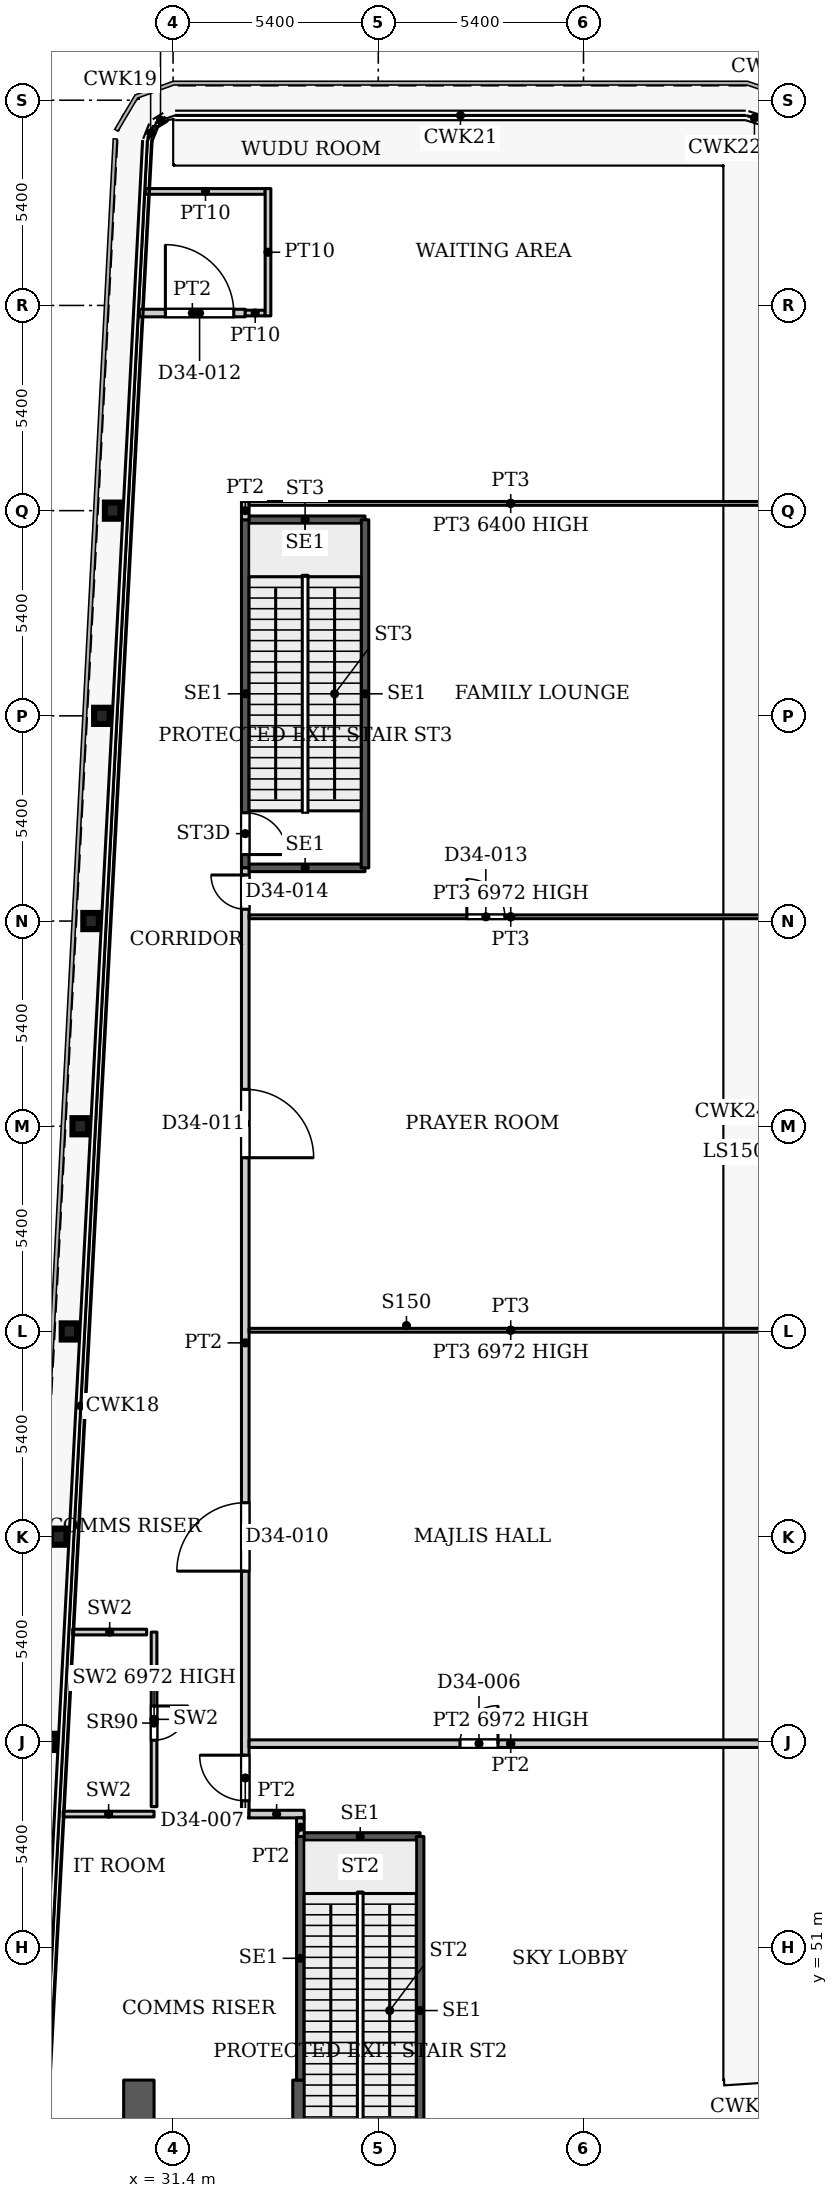
"""IFC4 building model, lengths in metres.
Left out: names, types, materials, properties, quantities, classifications, styles, units other than length and angle.
Written with IfcOpenShell. Run it as: python <this file> out.ifc"""

import sys

from ifc_helpers import new_model, si_unit, direction, frame, frame_2d, origin, origin_2d, place, context, subcontext, project, spatial, rectangle, i_section, extrude, source, transform, mapped, element, fill, save


model = new_model("IFC4")
c1 = context("Model", 3, precision=1e-05, world=origin(), true_north=direction((0.0, 1.0)))
c2 = subcontext(c1, "Body", "Model", "MODEL_VIEW")
j1 = project(units=[si_unit("LENGTHUNIT", "METRE"), si_unit("PLANEANGLEUNIT", "RADIAN")], contexts=[c1])
p1 = place(None, origin())
s1 = spatial("IfcSite", under=j1, at=p1, CompositionType="ELEMENT")
p2 = place(p1, origin())
s2 = spatial("IfcBuilding", under=s1, at=p2, CompositionType="ELEMENT")
p3 = place(p2, frame((0.0, 0.0, 144.8)))
s3 = spatial("IfcBuildingStorey", under=s2, at=p3, CompositionType="ELEMENT", Elevation=144.8)
for number, where, z_axis, x_axis in (
    (1, (28.106, 56.4, 0.0), (0.0, 0.0, 1.0), (1.0, 0.0, 0.0)),
    (2, (28.39, 61.8, 0.0), (0.0, 0.0, 1.0), (1.0, 0.0, 0.0)),
    (3, (28.674, 67.2, 0.0), (0.0, 0.0, 1.0), (1.0, 0.0, 0.0)),
    (4, (28.958, 72.6, 0.0), (0.0, 0.0, 1.0), (1.0, 0.0, 0.0)),
    (5, (29.243, 78.0, 0.0), (0.0, 0.0, 1.0), (1.0, 0.0, 0.0)),
    (6, (29.527, 83.4, 0.0), (0.0, 0.0, 1.0), (1.0, 0.0, 0.0)),
    (7, (29.811, 88.8, 0.0), (0.0, 0.0, 1.0), (1.0, 0.0, 0.0)),
):
    element("IfcColumn", number, at=place(p3, frame(where, z_axis=z_axis, x_axis=x_axis)), inside=s3, PredefinedType="COLUMN", context=c2, shape_type="SweptSolid", body=[
        extrude(i_section(OverallWidth=0.409, OverallDepth=0.425, WebThickness=0.033, FlangeThickness=0.052, FilletRadius=0.013, at=origin_2d()), origin(), (0.0, 0.0, 1.0), 7.8),
    ])
p4 = place(p3, frame((34.75, 29.05, 0.0), z_axis=(0.0, 0.0, 1.0), x_axis=(0.0, 1.0, 0.0)))
e8 = element("IfcWall", 8, at=p4, inside=s3, PredefinedType="SHEAR", context=c2, shape_type="SweptSolid", body=[
    extrude(rectangle(XDim=18.45, YDim=0.4, at=frame_2d((9.225, 0.0))), origin(), (0.0, 0.0, 1.0), 7.8),
])
p5 = place(p4, frame((8.025, 0.0, 0.0)))
e9 = element("IfcOpeningElement", 9, at=p5, cuts=e8, PredefinedType="OPENING", context=c2, shape_type="SweptSolid", body=[
    extrude(rectangle(XDim=1.1, YDim=2.2, at=frame_2d((0.55, 1.1))), frame((0.0, 0.21, 0.0), z_axis=(0.0, -1.0, 0.0), x_axis=(1.0, 0.0, 0.0)), (0.0, 0.0, 1.0), 0.42),
])
p6 = place(p4, frame((10.875, 0.0, 0.0)))
e10 = element("IfcOpeningElement", 10, at=p6, cuts=e8, PredefinedType="OPENING", context=c2, shape_type="SweptSolid", body=[
    extrude(rectangle(XDim=1.1, YDim=2.2, at=frame_2d((0.55, 1.1))), frame((0.0, 0.21, 0.0), z_axis=(0.0, -1.0, 0.0), x_axis=(1.0, 0.0, 0.0)), (0.0, 0.0, 1.0), 0.42),
])
p7 = place(p4, frame((13.725, 0.0, 0.0)))
e11 = element("IfcOpeningElement", 11, at=p7, cuts=e8, PredefinedType="OPENING", context=c2, shape_type="SweptSolid", body=[
    extrude(rectangle(XDim=1.1, YDim=2.2, at=frame_2d((0.55, 1.1))), frame((0.0, 0.21, 0.0), z_axis=(0.0, -1.0, 0.0), x_axis=(1.0, 0.0, 0.0)), (0.0, 0.0, 1.0), 0.42),
])
p8 = place(p4, frame((15.95, 0.0, 0.0)))
e12 = element("IfcOpeningElement", 12, at=p8, cuts=e8, PredefinedType="OPENING", context=c2, shape_type="SweptSolid", body=[
    extrude(rectangle(XDim=1.1, YDim=2.2, at=frame_2d((0.55, 1.1))), frame((0.0, 0.21, 0.0), z_axis=(0.0, -1.0, 0.0), x_axis=(1.0, 0.0, 0.0)), (0.0, 0.0, 1.0), 0.42),
])
p9 = place(p3, frame((30.5, 29.05, 0.0), z_axis=(0.0, 0.0, 1.0), x_axis=(0.0, 1.0, 0.0)))
e13 = element("IfcWall", 13, at=p9, inside=s3, PredefinedType="SHEAR", context=c2, shape_type="SweptSolid", body=[
    extrude(rectangle(XDim=18.45, YDim=0.8, at=frame_2d((9.225, 0.0))), origin(), (0.0, 0.0, 1.0), 7.8),
])
p10 = place(p9, frame((1.5, 0.0, 0.0)))
e14 = element("IfcOpeningElement", 14, at=p10, cuts=e13, PredefinedType="OPENING", context=c2, shape_type="SweptSolid", body=[
    extrude(rectangle(XDim=0.9, YDim=2.2, at=frame_2d((0.45, 1.1))), frame((0.0, 0.41, 0.0), z_axis=(0.0, -1.0, 0.0), x_axis=(1.0, 0.0, 0.0)), (0.0, 0.0, 1.0), 0.82),
])
p11 = place(p9, frame((7.744, 0.0, 0.0)))
e15 = element("IfcOpeningElement", 15, at=p11, cuts=e13, PredefinedType="OPENING", context=c2, shape_type="SweptSolid", body=[
    extrude(rectangle(XDim=0.9, YDim=2.2, at=frame_2d((0.45, 1.1))), frame((0.0, 0.41, 0.0), z_axis=(0.0, -1.0, 0.0), x_axis=(1.0, 0.0, 0.0)), (0.0, 0.0, 1.0), 0.82),
])
p12 = place(p9, frame((11.568, 0.0, 0.0)))
e16 = element("IfcOpeningElement", 16, at=p12, cuts=e13, PredefinedType="OPENING", context=c2, shape_type="SweptSolid", body=[
    extrude(rectangle(XDim=0.9, YDim=2.2, at=frame_2d((0.45, 1.1))), frame((0.0, 0.41, 0.0), z_axis=(0.0, -1.0, 0.0), x_axis=(1.0, 0.0, 0.0)), (0.0, 0.0, 1.0), 0.82),
])
p13 = place(p3, frame((34.75, 53.91, 0.0), z_axis=(0.0, 0.0, 1.0), x_axis=(1.0, 0.0, 0.0)))
e17 = element("IfcWall", 17, at=p13, inside=s3, PredefinedType="SHEAR", context=c2, shape_type="SweptSolid", body=[
    extrude(rectangle(XDim=3.15, YDim=0.2, at=frame_2d((1.575, 0.0))), origin(), (0.0, 0.0, 1.0), 7.8),
])
p14 = place(p3, frame((34.75, 47.5, 0.0), z_axis=(0.0, 0.0, 1.0), x_axis=(0.0, 1.0, 0.0)))
e18 = element("IfcWall", 18, at=p14, inside=s3, PredefinedType="SHEAR", context=c2, shape_type="SweptSolid", body=[
    extrude(rectangle(XDim=6.41, YDim=0.2, at=frame_2d((3.205, 0.0))), origin(), (0.0, 0.0, 1.0), 7.8),
])
p15 = place(p3, frame((37.9, 44.75, 0.0), z_axis=(0.0, 0.0, 1.0), x_axis=(0.0, 1.0, 0.0)))
e19 = element("IfcWall", 19, at=p15, inside=s3, PredefinedType="SHEAR", context=c2, shape_type="SweptSolid", body=[
    extrude(rectangle(XDim=9.16, YDim=0.2, at=frame_2d((4.58, 0.0))), origin(), (0.0, 0.0, 1.0), 7.8),
])
for number, where, z_axis, x_axis in (
    (20, (33.3, 79.4, 0.0), (0.0, 0.0, 1.0), (1.0, 0.0, 0.0)),
    (21, (33.3, 88.56, 0.0), (0.0, 0.0, 1.0), (1.0, 0.0, 0.0)),
):
    element("IfcWall", number, at=place(p3, frame(where, z_axis=z_axis, x_axis=x_axis)), inside=s3, PredefinedType="SHEAR", context=c2, shape_type="SweptSolid", body=[
        extrude(rectangle(XDim=3.15, YDim=0.2, at=frame_2d((1.575, 0.0))), origin(), (0.0, 0.0, 1.0), 7.8),
    ])
p16 = place(p3, frame((33.3, 79.4, 0.0), z_axis=(0.0, 0.0, 1.0), x_axis=(0.0, 1.0, 0.0)))
e22 = element("IfcWall", 22, at=p16, inside=s3, PredefinedType="SHEAR", context=c2, shape_type="SweptSolid", body=[
    extrude(rectangle(XDim=9.16, YDim=0.2, at=frame_2d((4.58, 0.0))), origin(), (0.0, 0.0, 1.0), 7.8),
])
p17 = place(p16, frame((0.35, 0.0, 0.0)))
e23 = element("IfcOpeningElement", 23, at=p17, cuts=e22, PredefinedType="OPENING", context=c2, shape_type="SweptSolid", body=[
    extrude(rectangle(XDim=1.1, YDim=2.2, at=frame_2d((0.55, 1.1))), frame((0.0, 0.11, 0.0), z_axis=(0.0, -1.0, 0.0), x_axis=(1.0, 0.0, 0.0)), (0.0, 0.0, 1.0), 0.22),
])
p18 = place(p3, frame((36.45, 79.4, 0.0), z_axis=(0.0, 0.0, 1.0), x_axis=(0.0, 1.0, 0.0)))
e24 = element("IfcWall", 24, at=p18, inside=s3, PredefinedType="SHEAR", context=c2, shape_type="SweptSolid", body=[
    extrude(rectangle(XDim=9.16, YDim=0.2, at=frame_2d((4.58, 0.0))), origin(), (0.0, 0.0, 1.0), 7.8),
])
p19 = place(p3, frame((28.508, 54.5, 0.0), z_axis=(0.0, 0.0, 1.0), x_axis=(1.0, 0.0, 0.0)))
e25 = element("IfcWall", 25, at=p19, inside=s3, PredefinedType="PARTITIONING", context=c2, shape_type="SweptSolid", body=[
    extrude(rectangle(XDim=2.392, YDim=0.15, at=frame_2d((1.196, 0.0))), origin(), (0.0, 0.0, 1.0), 7.8),
])
p20 = place(p3, frame((30.9, 54.695, 0.0), z_axis=(0.0, 0.0, 1.0), x_axis=(0.0, 1.0, 0.0)))
e26 = element("IfcWall", 26, at=p20, inside=s3, PredefinedType="PARTITIONING", context=c2, shape_type="SweptSolid", body=[
    extrude(rectangle(XDim=4.595, YDim=0.15, at=frame_2d((2.297, 0.0))), origin(), (0.0, 0.0, 1.0), 6.972),
])
p21 = place(p20, frame((1.75, 0.0, 0.0)))
e27 = element("IfcOpeningElement", 27, at=p21, cuts=e26, PredefinedType="OPENING", context=c2, shape_type="SweptSolid", body=[
    extrude(rectangle(XDim=0.9, YDim=2.2, at=frame_2d((0.45, 1.1))), frame((0.0, 0.085, 0.0), z_axis=(0.0, -1.0, 0.0), x_axis=(1.0, 0.0, 0.0)), (0.0, 0.0, 1.0), 0.17),
])
p22 = place(p3, frame((28.76, 59.29, 0.0), z_axis=(0.0, 0.0, 1.0), x_axis=(1.0, 0.0, 0.0)))
e28 = element("IfcWall", 28, at=p22, inside=s3, PredefinedType="PARTITIONING", context=c2, shape_type="SweptSolid", body=[
    extrude(rectangle(XDim=1.945, YDim=0.15, at=frame_2d((0.973, 0.0))), origin(), (0.0, 0.0, 1.0), 7.8),
])
p23 = place(p3, frame((30.683, 97.2, 0.0), z_axis=(0.0, 0.0, 1.0), x_axis=(1.0, 0.0, 0.0)))
e29 = element("IfcWall", 29, at=p23, inside=s3, PredefinedType="PARTITIONING", context=c2, shape_type="SweptSolid", body=[
    extrude(rectangle(XDim=3.14, YDim=0.15, at=frame_2d((1.57, 0.0))), origin(), (0.0, 0.0, 1.0), 7.5),
])
p24 = place(p3, frame((30.515, 94.0, 0.0), z_axis=(0.0, 0.0, 1.0), x_axis=(1.0, 0.0, 0.0)))
e30 = element("IfcWall", 30, at=p24, inside=s3, PredefinedType="PARTITIONING", context=c2, shape_type="SweptSolid", body=[
    extrude(rectangle(XDim=2.785, YDim=0.2, at=frame_2d((1.393, 0.0))), origin(), (0.0, 0.0, 1.0), 7.5),
])
p25 = place(p24, frame((0.683, 0.0, 0.0)))
e31 = element("IfcOpeningElement", 31, at=p25, cuts=e30, PredefinedType="OPENING", context=c2, shape_type="SweptSolid", body=[
    extrude(rectangle(XDim=1.8, YDim=2.1, at=frame_2d((0.9, 1.05))), frame((0.0, 0.11, 0.0), z_axis=(0.0, -1.0, 0.0), x_axis=(1.0, 0.0, 0.0)), (0.0, 0.0, 1.0), 0.22),
])
p26 = place(p3, frame((33.3, 54.4, 0.0), z_axis=(0.0, 0.0, 1.0), x_axis=(0.0, 1.0, 0.0)))
e32 = element("IfcWall", 32, at=p26, inside=s3, PredefinedType="PARTITIONING", context=c2, shape_type="SweptSolid", body=[
    extrude(rectangle(XDim=25.0, YDim=0.2, at=frame_2d((12.5, 0.0))), origin(), (0.0, 0.0, 1.0), 7.5),
])
p27 = place(p26, frame((0.45, 0.0, 0.0)))
e33 = element("IfcOpeningElement", 33, at=p27, cuts=e32, PredefinedType="OPENING", context=c2, shape_type="SweptSolid", body=[
    extrude(rectangle(XDim=1.2, YDim=2.1, at=frame_2d((0.6, 1.05))), frame((0.0, 0.11, 0.0), z_axis=(0.0, -1.0, 0.0), x_axis=(1.0, 0.0, 0.0)), (0.0, 0.0, 1.0), 0.22),
])
p28 = place(p26, frame((6.493, 0.0, 0.0)))
e34 = element("IfcOpeningElement", 34, at=p28, cuts=e32, PredefinedType="OPENING", context=c2, shape_type="SweptSolid", body=[
    extrude(rectangle(XDim=1.8, YDim=2.1, at=frame_2d((0.9, 1.05))), frame((0.0, 0.11, 0.0), z_axis=(0.0, -1.0, 0.0), x_axis=(1.0, 0.0, 0.0)), (0.0, 0.0, 1.0), 0.22),
])
p29 = place(p26, frame((17.372, 0.0, 0.0)))
e35 = element("IfcOpeningElement", 35, at=p29, cuts=e32, PredefinedType="OPENING", context=c2, shape_type="SweptSolid", body=[
    extrude(rectangle(XDim=1.8, YDim=2.1, at=frame_2d((0.9, 1.05))), frame((0.0, 0.11, 0.0), z_axis=(0.0, -1.0, 0.0), x_axis=(1.0, 0.0, 0.0)), (0.0, 0.0, 1.0), 0.22),
])
p30 = place(p26, frame((23.912, 0.0, 0.0)))
e36 = element("IfcOpeningElement", 36, at=p30, cuts=e32, PredefinedType="OPENING", context=c2, shape_type="SweptSolid", body=[
    extrude(rectangle(XDim=0.9, YDim=2.1, at=frame_2d((0.45, 1.05))), frame((0.0, 0.11, 0.0), z_axis=(0.0, -1.0, 0.0), x_axis=(1.0, 0.0, 0.0)), (0.0, 0.0, 1.0), 0.22),
])
p31 = place(p3, frame((33.3, 88.56, 0.0), z_axis=(0.0, 0.0, 1.0), x_axis=(0.0, 1.0, 0.0)))
e37 = element("IfcWall", 37, at=p31, inside=s3, PredefinedType="PARTITIONING", context=c2, shape_type="SweptSolid", body=[
    extrude(rectangle(XDim=0.481, YDim=0.2, at=frame_2d((0.24, 0.0))), origin(), (0.0, 0.0, 1.0), 7.5),
])
p32 = place(p3, frame((33.3, 94.0, 0.0), z_axis=(0.0, 0.0, 1.0), x_axis=(1.0, 0.0, 0.0)))
e38 = element("IfcWall", 38, at=p32, inside=s3, PredefinedType="PARTITIONING", context=c2, shape_type="SweptSolid", body=[
    extrude(rectangle(XDim=0.523, YDim=0.15, at=frame_2d((0.261, 0.0))), origin(), (0.0, 0.0, 1.0), 7.5),
])
p33 = place(p3, frame((33.4, 54.5, 0.0), z_axis=(0.0, 0.0, 1.0), x_axis=(1.0, 0.0, 0.0)))
e39 = element("IfcWall", 39, at=p33, inside=s3, PredefinedType="PARTITIONING", context=c2, shape_type="SweptSolid", body=[
    extrude(rectangle(XDim=1.45, YDim=0.2, at=frame_2d((0.725, 0.0))), origin(), (0.0, 0.0, 1.0), 7.5),
])
p34 = place(p3, frame((33.4, 56.353, 0.0), z_axis=(0.0, 0.0, 1.0), x_axis=(1.0, 0.0, 0.0)))
e40 = element("IfcWall", 40, at=p34, inside=s3, PredefinedType="PARTITIONING", context=c2, shape_type="SweptSolid", body=[
    extrude(rectangle(XDim=13.77, YDim=0.2, at=frame_2d((6.885, 0.0))), origin(), (0.0, 0.0, 1.0), 6.972),
])
p35 = place(p34, frame((5.55, 0.0, 0.0)))
e41 = element("IfcOpeningElement", 41, at=p35, cuts=e40, PredefinedType="OPENING", context=c2, shape_type="SweptSolid", body=[
    extrude(rectangle(XDim=1.0, YDim=2.1, at=frame_2d((0.5, 1.05))), frame((0.0, 0.11, 0.0), z_axis=(0.0, -1.0, 0.0), x_axis=(1.0, 0.0, 0.0)), (0.0, 0.0, 1.0), 0.22),
])
p36 = place(p3, frame((33.4, 67.232, 0.0), z_axis=(0.0, 0.0, 1.0), x_axis=(1.0, 0.0, 0.0)))
e42 = element("IfcWall", 42, at=p36, inside=s3, PredefinedType="PARTITIONING", context=c2, shape_type="SweptSolid", body=[
    extrude(rectangle(XDim=13.77, YDim=0.1, at=frame_2d((6.885, 0.0))), origin(), (0.0, 0.0, 1.0), 6.972),
])
p37 = place(p3, frame((33.4, 78.112, 0.0), z_axis=(0.0, 0.0, 1.0), x_axis=(1.0, 0.0, 0.0)))
e43 = element("IfcWall", 43, at=p37, inside=s3, PredefinedType="PARTITIONING", context=c2, shape_type="SweptSolid", body=[
    extrude(rectangle(XDim=13.77, YDim=0.1, at=frame_2d((6.885, 0.0))), origin(), (0.0, 0.0, 1.0), 6.972),
])
p38 = place(p37, frame((5.73, 0.0, 0.0)))
e44 = element("IfcOpeningElement", 44, at=p38, cuts=e43, PredefinedType="OPENING", context=c2, shape_type="SweptSolid", body=[
    extrude(rectangle(XDim=1.0, YDim=2.1, at=frame_2d((0.5, 1.05))), frame((0.0, 0.06, 0.0), z_axis=(0.0, -1.0, 0.0), x_axis=(1.0, 0.0, 0.0)), (0.0, 0.0, 1.0), 0.12),
])
p39 = place(p3, frame((33.4, 88.991, 0.0), z_axis=(0.0, 0.0, 1.0), x_axis=(1.0, 0.0, 0.0)))
e45 = element("IfcWall", 45, at=p39, inside=s3, PredefinedType="PARTITIONING", context=c2, shape_type="SweptSolid", body=[
    extrude(rectangle(XDim=13.77, YDim=0.1, at=frame_2d((6.885, 0.0))), origin(), (0.0, 0.0, 1.0), 6.4),
])
p40 = place(p3, frame((33.898, 93.925, 0.0), z_axis=(0.0, 0.0, 1.0), x_axis=(0.0, 1.0, 0.0)))
e46 = element("IfcWall", 46, at=p40, inside=s3, PredefinedType="PARTITIONING", context=c2, shape_type="SweptSolid", body=[
    extrude(rectangle(XDim=3.35, YDim=0.15, at=frame_2d((1.675, 0.0))), origin(), (0.0, 0.0, 1.0), 7.5),
])
p41 = place(p3, frame((34.75, 53.91, 0.0), z_axis=(0.0, 0.0, 1.0), x_axis=(0.0, 1.0, 0.0)))
e47 = element("IfcWall", 47, at=p41, inside=s3, PredefinedType="PARTITIONING", context=c2, shape_type="SweptSolid", body=[
    extrude(rectangle(XDim=0.49, YDim=0.2, at=frame_2d((0.245, 0.0))), origin(), (0.0, 0.0, 1.0), 7.5),
])
m1 = source(origin(), c2, "Body", "SweptSolid", [
    extrude(rectangle(XDim=0.9, YDim=2.2, at=frame_2d((0.45, 1.1))), frame((0.0, 0.025, 0.0), z_axis=(0.0, -1.0, 0.0), x_axis=(1.0, 0.0, 0.0)), (0.0, 0.0, 1.0), 0.05),
])
p42 = place(p21, origin())
e48 = element("IfcDoor", 48, at=p42, inside=s3, OperationType="SINGLE_SWING_RIGHT", PredefinedType="DOOR", context=c2, shape_type="MappedRepresentation", body=[
    mapped(m1, transform((0.0, 0.0, 0.0), x_axis=(1.0, 0.0, 0.0), y_axis=(0.0, 1.0, 0.0), z_axis=(0.0, 0.0, 1.0), scale=1.0)),
])
fill(e27, e48)
m2 = source(origin(), c2, "Body", "SweptSolid", [
    extrude(rectangle(XDim=1.1, YDim=2.2, at=frame_2d((0.55, 1.1))), frame((0.0, 0.025, 0.0), z_axis=(0.0, -1.0, 0.0), x_axis=(1.0, 0.0, 0.0)), (0.0, 0.0, 1.0), 0.05),
])
p43 = place(p17, origin())
e49 = element("IfcDoor", 49, at=p43, inside=s3, OperationType="SINGLE_SWING_RIGHT", PredefinedType="DOOR", context=c2, shape_type="MappedRepresentation", body=[
    mapped(m2, transform((0.0, 0.0, 0.0), x_axis=(1.0, 0.0, 0.0), y_axis=(0.0, 1.0, 0.0), z_axis=(0.0, 0.0, 1.0), scale=1.0)),
])
fill(e23, e49)
m3 = source(origin(), c2, "Body", "SweptSolid", [
    extrude(rectangle(XDim=1.0, YDim=2.1, at=frame_2d((0.5, 1.05))), frame((0.0, 0.025, 0.0), z_axis=(0.0, -1.0, 0.0), x_axis=(1.0, 0.0, 0.0)), (0.0, 0.0, 1.0), 0.05),
])
p44 = place(p35, origin())
e50 = element("IfcDoor", 50, at=p44, inside=s3, OperationType="SINGLE_SWING_LEFT", PredefinedType="DOOR", context=c2, shape_type="MappedRepresentation", body=[
    mapped(m3, transform((0.0, 0.0, 0.0), x_axis=(1.0, 0.0, 0.0), y_axis=(0.0, 1.0, 0.0), z_axis=(0.0, 0.0, 1.0), scale=1.0)),
])
fill(e41, e50)
m4 = source(origin(), c2, "Body", "SweptSolid", [
    extrude(rectangle(XDim=1.2, YDim=2.1, at=frame_2d((0.6, 1.05))), frame((0.0, 0.025, 0.0), z_axis=(0.0, -1.0, 0.0), x_axis=(1.0, 0.0, 0.0)), (0.0, 0.0, 1.0), 0.05),
])
p45 = place(p27, origin())
e51 = element("IfcDoor", 51, at=p45, inside=s3, OperationType="SINGLE_SWING_LEFT", PredefinedType="DOOR", context=c2, shape_type="MappedRepresentation", body=[
    mapped(m4, transform((0.0, 0.0, 0.0), x_axis=(1.0, 0.0, 0.0), y_axis=(0.0, 1.0, 0.0), z_axis=(0.0, 0.0, 1.0), scale=1.0)),
])
fill(e33, e51)
m5 = source(origin(), c2, "Body", "SweptSolid", [
    extrude(rectangle(XDim=1.8, YDim=2.1, at=frame_2d((0.9, 1.05))), frame((0.0, 0.025, 0.0), z_axis=(0.0, -1.0, 0.0), x_axis=(1.0, 0.0, 0.0)), (0.0, 0.0, 1.0), 0.05),
])
p46 = place(p28, origin())
e52 = element("IfcDoor", 52, at=p46, inside=s3, OperationType="DOUBLE_DOOR_SINGLE_SWING", PredefinedType="DOOR", context=c2, shape_type="MappedRepresentation", body=[
    mapped(m5, transform((0.0, 0.0, 0.0), x_axis=(1.0, 0.0, 0.0), y_axis=(0.0, 1.0, 0.0), z_axis=(0.0, 0.0, 1.0), scale=1.0)),
])
fill(e34, e52)
p47 = place(p29, origin())
e53 = element("IfcDoor", 53, at=p47, inside=s3, OperationType="DOUBLE_DOOR_SINGLE_SWING", PredefinedType="DOOR", context=c2, shape_type="MappedRepresentation", body=[
    mapped(m5, transform((0.0, 0.0, 0.0), x_axis=(1.0, 0.0, 0.0), y_axis=(0.0, 1.0, 0.0), z_axis=(0.0, 0.0, 1.0), scale=1.0)),
])
fill(e35, e53)
p48 = place(p25, origin())
e54 = element("IfcDoor", 54, at=p48, inside=s3, OperationType="DOUBLE_DOOR_SINGLE_SWING", PredefinedType="DOOR", context=c2, shape_type="MappedRepresentation", body=[
    mapped(m5, transform((0.0, 0.0, 0.0), x_axis=(1.0, 0.0, 0.0), y_axis=(0.0, 1.0, 0.0), z_axis=(0.0, 0.0, 1.0), scale=1.0)),
])
fill(e31, e54)
m6 = source(origin(), c2, "Body", "SweptSolid", [
    extrude(rectangle(XDim=1.0, YDim=2.1, at=frame_2d((0.5, 1.05))), frame((0.0, 0.025, 0.0), z_axis=(0.0, -1.0, 0.0), x_axis=(1.0, 0.0, 0.0)), (0.0, 0.0, 1.0), 0.05),
])
p49 = place(p38, origin())
e55 = element("IfcDoor", 55, at=p49, inside=s3, OperationType="SINGLE_SWING_LEFT", PredefinedType="DOOR", context=c2, shape_type="MappedRepresentation", body=[
    mapped(m6, transform((0.0, 0.0, 0.0), x_axis=(1.0, 0.0, 0.0), y_axis=(0.0, 1.0, 0.0), z_axis=(0.0, 0.0, 1.0), scale=1.0)),
])
fill(e44, e55)
m7 = source(origin(), c2, "Body", "SweptSolid", [
    extrude(rectangle(XDim=0.9, YDim=2.1, at=frame_2d((0.45, 1.05))), frame((0.0, 0.025, 0.0), z_axis=(0.0, -1.0, 0.0), x_axis=(1.0, 0.0, 0.0)), (0.0, 0.0, 1.0), 0.05),
])
p50 = place(p30, origin())
e56 = element("IfcDoor", 56, at=p50, inside=s3, OperationType="SINGLE_SWING_LEFT", PredefinedType="DOOR", context=c2, shape_type="MappedRepresentation", body=[
    mapped(m7, transform((0.0, 0.0, 0.0), x_axis=(1.0, 0.0, 0.0), y_axis=(0.0, 1.0, 0.0), z_axis=(0.0, 0.0, 1.0), scale=1.0)),
])
fill(e36, e56)
save(model, sys.argv[1])
